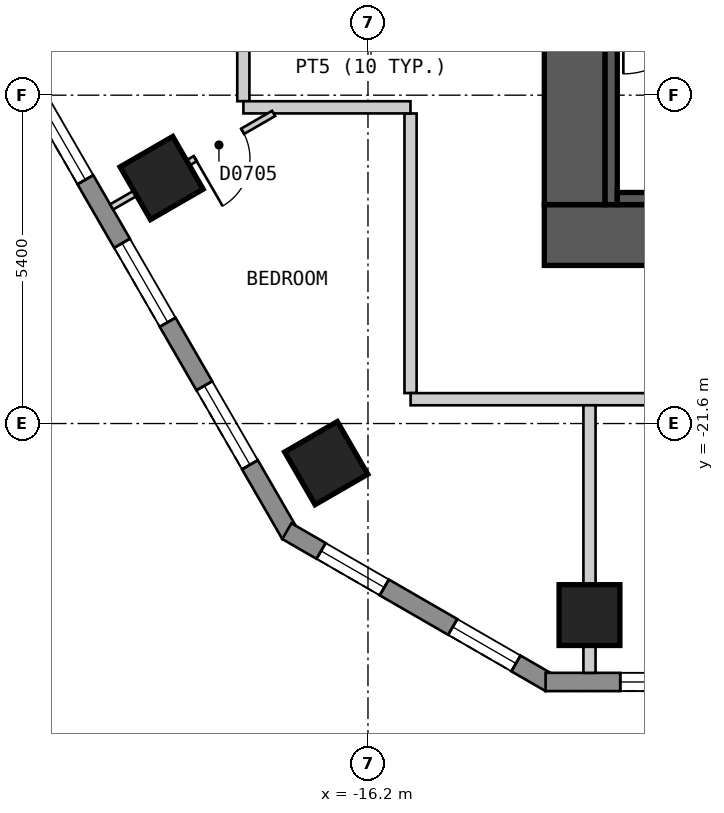
"""IFC4 building model, lengths in metres.
Left out: names, types, materials, properties, quantities, classifications, styles, units other than length and angle.
Written with IfcOpenShell. Run it as: python <this file> out.ifc"""

import sys

from ifc_helpers import new_model, si_unit, direction, frame, frame_2d, origin, origin_2d, place, context, subcontext, project, spatial, polyline, rectangle, outline, extrude, element, fill, save


model = new_model("IFC4")
c1 = context("Model", 3, precision=1e-05, world=origin(), true_north=direction((0.0, 1.0)))
c2 = subcontext(c1, "Body", "Model", "MODEL_VIEW")
j1 = project(units=[si_unit("LENGTHUNIT", "METRE"), si_unit("PLANEANGLEUNIT", "RADIAN")], contexts=[c1])
p1 = place(None, origin())
s1 = spatial("IfcSite", under=j1, at=p1, CompositionType="ELEMENT")
p2 = place(p1, origin())
s2 = spatial("IfcBuilding", under=s1, at=p2, CompositionType="ELEMENT")
p3 = place(p2, frame((0.0, 0.0, 99.0)))
s3 = spatial("IfcBuildingStorey", under=s2, at=p3, CompositionType="ELEMENT", Elevation=99.0)
for number, where, z_axis, x_axis in (
    (1, (-19.594, -17.563, 0.0), (0.0, 0.0, 1.0), (0.5, -0.866, 0.0)),
    (2, (-16.887, -22.251, 0.0), (0.0, 0.0, 1.0), (0.5, -0.866, 0.0)),
    (3, (-12.557, -24.75, 0.0), (0.0, 0.0, 1.0), (1.0, 0.0, 0.0)),
):
    element("IfcColumn", number, at=place(p3, frame(where, z_axis=z_axis, x_axis=x_axis)), inside=s3, PredefinedType="COLUMN", context=c2, shape_type="SweptSolid", body=[
        extrude(rectangle(XDim=1.0, YDim=1.0, at=origin_2d()), origin(), (0.0, 0.0, 1.0), 3.0),
    ])
p4 = place(p3, frame((-13.3, -18.5, 0.0), z_axis=(0.0, 0.0, 1.0), x_axis=(1.0, 0.0, 0.0)))
e4 = element("IfcWall", 4, at=p4, inside=s3, PredefinedType="SHEAR", context=c2, shape_type="SweptSolid", body=[
    extrude(rectangle(XDim=26.6, YDim=1.0, at=frame_2d((13.3, 0.0))), origin(), (0.0, 0.0, 1.0), 2.7),
])
p5 = place(p3, frame((-12.8, -18.0, 0.0), z_axis=(0.0, 0.0, 1.0), x_axis=(0.0, 1.0, 0.0)))
e5 = element("IfcWall", 5, at=p5, inside=s3, PredefinedType="SHEAR", context=c2, shape_type="SweptSolid", body=[
    extrude(rectangle(XDim=12.0, YDim=1.0, at=frame_2d((6.0, 0.0))), origin(), (0.0, 0.0, 1.0), 2.7),
])
p6 = place(p5, frame((3.8, 0.0, 0.0)))
e6 = element("IfcOpeningElement", 6, at=p6, cuts=e5, PredefinedType="OPENING", context=c2, shape_type="SweptSolid", body=[
    extrude(rectangle(XDim=1.2, YDim=2.1, at=frame_2d((0.6, 1.05))), frame((0.0, 0.51, 0.0), z_axis=(0.0, -1.0, 0.0), x_axis=(1.0, 0.0, 0.0)), (0.0, 0.0, 1.0), 1.02),
])
p7 = place(p3, frame((-29.027, -3.425, 0.0), z_axis=(0.0, 0.0, 1.0), x_axis=(0.500035407905, -0.866004960056, 0.0)))
e7 = element("IfcWall", 7, at=p7, inside=s3, PredefinedType="SOLIDWALL", context=c2, shape_type="SweptSolid", body=[
    extrude(outline(polyline([(0.0, -0.15), (23.094, -0.15), (23.014, 0.15), (0.08, 0.15), (0.0, -0.15)])), origin(), (0.0, 0.0, 1.0), 2.7),
])
p8 = place(p7, frame((1.324, 0.0, 0.15)))
e8 = element("IfcOpeningElement", 8, at=p8, cuts=e7, PredefinedType="OPENING", context=c2, shape_type="SweptSolid", body=[
    extrude(rectangle(XDim=1.5, YDim=2.1, at=frame_2d((0.75, 1.05))), frame((0.0, 0.16, 0.0), z_axis=(0.0, -1.0, 0.0), x_axis=(1.0, 0.0, 0.0)), (0.0, 0.0, 1.0), 0.32),
])
p9 = place(p7, frame((4.031, 0.0, 0.15)))
e9 = element("IfcOpeningElement", 9, at=p9, cuts=e7, PredefinedType="OPENING", context=c2, shape_type="SweptSolid", body=[
    extrude(rectangle(XDim=1.5, YDim=2.1, at=frame_2d((0.75, 1.05))), frame((0.0, 0.16, 0.0), z_axis=(0.0, -1.0, 0.0), x_axis=(1.0, 0.0, 0.0)), (0.0, 0.0, 1.0), 0.32),
])
p10 = place(p7, frame((6.737, 0.0, 0.15)))
e10 = element("IfcOpeningElement", 10, at=p10, cuts=e7, PredefinedType="OPENING", context=c2, shape_type="SweptSolid", body=[
    extrude(rectangle(XDim=1.5, YDim=2.1, at=frame_2d((0.75, 1.05))), frame((0.0, 0.16, 0.0), z_axis=(0.0, -1.0, 0.0), x_axis=(1.0, 0.0, 0.0)), (0.0, 0.0, 1.0), 0.32),
])
p11 = place(p7, frame((9.444, 0.0, 0.15)))
e11 = element("IfcOpeningElement", 11, at=p11, cuts=e7, PredefinedType="OPENING", context=c2, shape_type="SweptSolid", body=[
    extrude(rectangle(XDim=1.5, YDim=2.1, at=frame_2d((0.75, 1.05))), frame((0.0, 0.16, 0.0), z_axis=(0.0, -1.0, 0.0), x_axis=(1.0, 0.0, 0.0)), (0.0, 0.0, 1.0), 0.32),
])
p12 = place(p7, frame((12.151, 0.0, 0.15)))
e12 = element("IfcOpeningElement", 12, at=p12, cuts=e7, PredefinedType="OPENING", context=c2, shape_type="SweptSolid", body=[
    extrude(rectangle(XDim=1.5, YDim=2.1, at=frame_2d((0.75, 1.05))), frame((0.0, 0.16, 0.0), z_axis=(0.0, -1.0, 0.0), x_axis=(1.0, 0.0, 0.0)), (0.0, 0.0, 1.0), 0.32),
])
p13 = place(p7, frame((14.857, 0.0, 0.15)))
e13 = element("IfcOpeningElement", 13, at=p13, cuts=e7, PredefinedType="OPENING", context=c2, shape_type="SweptSolid", body=[
    extrude(rectangle(XDim=1.5, YDim=2.1, at=frame_2d((0.75, 1.05))), frame((0.0, 0.16, 0.0), z_axis=(0.0, -1.0, 0.0), x_axis=(1.0, 0.0, 0.0)), (0.0, 0.0, 1.0), 0.32),
])
p14 = place(p7, frame((17.564, 0.0, 0.15)))
e14 = element("IfcOpeningElement", 14, at=p14, cuts=e7, PredefinedType="OPENING", context=c2, shape_type="SweptSolid", body=[
    extrude(rectangle(XDim=1.5, YDim=2.1, at=frame_2d((0.75, 1.05))), frame((0.0, 0.16, 0.0), z_axis=(0.0, -1.0, 0.0), x_axis=(1.0, 0.0, 0.0)), (0.0, 0.0, 1.0), 0.32),
])
p15 = place(p7, frame((20.27, 0.0, 0.15)))
e15 = element("IfcOpeningElement", 15, at=p15, cuts=e7, PredefinedType="OPENING", context=c2, shape_type="SweptSolid", body=[
    extrude(rectangle(XDim=1.5, YDim=2.1, at=frame_2d((0.75, 1.05))), frame((0.0, 0.16, 0.0), z_axis=(0.0, -1.0, 0.0), x_axis=(1.0, 0.0, 0.0)), (0.0, 0.0, 1.0), 0.32),
])
p16 = place(p3, frame((-17.534, -23.37, 0.0), z_axis=(0.0, 0.0, 1.0), x_axis=(0.866010750942, -0.50002537861, 0.0)))
e16 = element("IfcWall", 16, at=p16, inside=s3, PredefinedType="SOLIDWALL", context=c2, shape_type="SweptSolid", body=[
    extrude(outline(polyline([(0.0, -0.15), (5.0, -0.15), (4.919, 0.15), (0.08, 0.15), (0.0, -0.15)])), origin(), (0.0, 0.0, 1.0), 2.7),
])
p17 = place(p16, frame((0.65, 0.0, 0.15)))
e17 = element("IfcOpeningElement", 17, at=p17, cuts=e16, PredefinedType="OPENING", context=c2, shape_type="SweptSolid", body=[
    extrude(rectangle(XDim=1.2, YDim=2.1, at=frame_2d((0.6, 1.05))), frame((0.0, 0.16, 0.0), z_axis=(0.0, -1.0, 0.0), x_axis=(1.0, 0.0, 0.0)), (0.0, 0.0, 1.0), 0.32),
])
p18 = place(p16, frame((3.15, 0.0, 0.15)))
e18 = element("IfcOpeningElement", 18, at=p18, cuts=e16, PredefinedType="OPENING", context=c2, shape_type="SweptSolid", body=[
    extrude(rectangle(XDim=1.2, YDim=2.1, at=frame_2d((0.6, 1.05))), frame((0.0, 0.16, 0.0), z_axis=(0.0, -1.0, 0.0), x_axis=(1.0, 0.0, 0.0)), (0.0, 0.0, 1.0), 0.32),
])
p19 = place(p3, frame((-13.279, -25.85, 0.0), z_axis=(0.0, 0.0, 1.0), x_axis=(1.0, 0.0, 0.0)))
e19 = element("IfcWall", 19, at=p19, inside=s3, PredefinedType="SOLIDWALL", context=c2, shape_type="SweptSolid", body=[
    extrude(outline(polyline([(0.0, -0.15), (26.558, -0.15), (26.478, 0.15), (0.08, 0.15), (0.0, -0.15)])), origin(), (0.0, 0.0, 1.0), 2.7),
])
p20 = place(p19, frame((1.228, 0.0, 0.15)))
e20 = element("IfcOpeningElement", 20, at=p20, cuts=e19, PredefinedType="OPENING", context=c2, shape_type="SweptSolid", body=[
    extrude(rectangle(XDim=1.5, YDim=2.1, at=frame_2d((0.75, 1.05))), frame((0.0, 0.16, 0.0), z_axis=(0.0, -1.0, 0.0), x_axis=(1.0, 0.0, 0.0)), (0.0, 0.0, 1.0), 0.32),
])
p21 = place(p19, frame((3.739, 0.0, 0.15)))
e21 = element("IfcOpeningElement", 21, at=p21, cuts=e19, PredefinedType="OPENING", context=c2, shape_type="SweptSolid", body=[
    extrude(rectangle(XDim=1.5, YDim=2.1, at=frame_2d((0.75, 1.05))), frame((0.0, 0.16, 0.0), z_axis=(0.0, -1.0, 0.0), x_axis=(1.0, 0.0, 0.0)), (0.0, 0.0, 1.0), 0.32),
])
p22 = place(p19, frame((6.251, 0.0, 0.15)))
e22 = element("IfcOpeningElement", 22, at=p22, cuts=e19, PredefinedType="OPENING", context=c2, shape_type="SweptSolid", body=[
    extrude(rectangle(XDim=1.5, YDim=2.1, at=frame_2d((0.75, 1.05))), frame((0.0, 0.16, 0.0), z_axis=(0.0, -1.0, 0.0), x_axis=(1.0, 0.0, 0.0)), (0.0, 0.0, 1.0), 0.32),
])
p23 = place(p19, frame((8.762, 0.0, 0.15)))
e23 = element("IfcOpeningElement", 23, at=p23, cuts=e19, PredefinedType="OPENING", context=c2, shape_type="SweptSolid", body=[
    extrude(rectangle(XDim=1.5, YDim=2.1, at=frame_2d((0.75, 1.05))), frame((0.0, 0.16, 0.0), z_axis=(0.0, -1.0, 0.0), x_axis=(1.0, 0.0, 0.0)), (0.0, 0.0, 1.0), 0.32),
])
p24 = place(p19, frame((11.274, 0.0, 0.15)))
e24 = element("IfcOpeningElement", 24, at=p24, cuts=e19, PredefinedType="OPENING", context=c2, shape_type="SweptSolid", body=[
    extrude(rectangle(XDim=1.5, YDim=2.1, at=frame_2d((0.75, 1.05))), frame((0.0, 0.16, 0.0), z_axis=(0.0, -1.0, 0.0), x_axis=(1.0, 0.0, 0.0)), (0.0, 0.0, 1.0), 0.32),
])
p25 = place(p19, frame((13.785, 0.0, 0.15)))
e25 = element("IfcOpeningElement", 25, at=p25, cuts=e19, PredefinedType="OPENING", context=c2, shape_type="SweptSolid", body=[
    extrude(rectangle(XDim=1.5, YDim=2.1, at=frame_2d((0.75, 1.05))), frame((0.0, 0.16, 0.0), z_axis=(0.0, -1.0, 0.0), x_axis=(1.0, 0.0, 0.0)), (0.0, 0.0, 1.0), 0.32),
])
p26 = place(p19, frame((16.297, 0.0, 0.15)))
e26 = element("IfcOpeningElement", 26, at=p26, cuts=e19, PredefinedType="OPENING", context=c2, shape_type="SweptSolid", body=[
    extrude(rectangle(XDim=1.5, YDim=2.1, at=frame_2d((0.75, 1.05))), frame((0.0, 0.16, 0.0), z_axis=(0.0, -1.0, 0.0), x_axis=(1.0, 0.0, 0.0)), (0.0, 0.0, 1.0), 0.32),
])
p27 = place(p19, frame((18.808, 0.0, 0.15)))
e27 = element("IfcOpeningElement", 27, at=p27, cuts=e19, PredefinedType="OPENING", context=c2, shape_type="SweptSolid", body=[
    extrude(rectangle(XDim=1.5, YDim=2.1, at=frame_2d((0.75, 1.05))), frame((0.0, 0.16, 0.0), z_axis=(0.0, -1.0, 0.0), x_axis=(1.0, 0.0, 0.0)), (0.0, 0.0, 1.0), 0.32),
])
p28 = place(p19, frame((21.32, 0.0, 0.15)))
e28 = element("IfcOpeningElement", 28, at=p28, cuts=e19, PredefinedType="OPENING", context=c2, shape_type="SweptSolid", body=[
    extrude(rectangle(XDim=1.5, YDim=2.1, at=frame_2d((0.75, 1.05))), frame((0.0, 0.16, 0.0), z_axis=(0.0, -1.0, 0.0), x_axis=(1.0, 0.0, 0.0)), (0.0, 0.0, 1.0), 0.32),
])
p29 = place(p19, frame((23.831, 0.0, 0.15)))
e29 = element("IfcOpeningElement", 29, at=p29, cuts=e19, PredefinedType="OPENING", context=c2, shape_type="SweptSolid", body=[
    extrude(rectangle(XDim=1.5, YDim=2.1, at=frame_2d((0.75, 1.05))), frame((0.0, 0.16, 0.0), z_axis=(0.0, -1.0, 0.0), x_axis=(1.0, 0.0, 0.0)), (0.0, 0.0, 1.0), 0.32),
])
p30 = place(p3, frame((-15.5, -16.501, 0.0), z_axis=(0.0, 0.0, 1.0), x_axis=(0.0, -1.0, 0.0)))
e30 = element("IfcWall", 30, at=p30, inside=s3, PredefinedType="PARTITIONING", context=c2, shape_type="SweptSolid", body=[
    extrude(rectangle(XDim=4.598, YDim=0.2, at=frame_2d((2.299, 0.0))), origin(), (0.0, 0.0, 1.0), 2.7),
])
p31 = place(p3, frame((-18.25, -10.594, 0.0), z_axis=(0.0, 0.0, 1.0), x_axis=(0.0, -1.0, 0.0)))
e31 = element("IfcWall", 31, at=p31, inside=s3, PredefinedType="PARTITIONING", context=c2, shape_type="SweptSolid", body=[
    extrude(rectangle(XDim=5.705, YDim=0.2, at=frame_2d((2.853, 0.0))), origin(), (0.0, 0.0, 1.0), 2.7),
])
p32 = place(p3, frame((-18.249, -16.4, 0.0), z_axis=(0.0, 0.0, 1.0), x_axis=(1.0, 0.0, 0.0)))
e32 = element("IfcWall", 32, at=p32, inside=s3, PredefinedType="PARTITIONING", context=c2, shape_type="SweptSolid", body=[
    extrude(rectangle(XDim=2.748, YDim=0.2, at=frame_2d((1.374, 0.0))), origin(), (0.0, 0.0, 1.0), 2.7),
])
p33 = place(p3, frame((-15.499, -21.2, 0.0), z_axis=(0.0, 0.0, 1.0), x_axis=(1.0, 0.0, 0.0)))
e33 = element("IfcWall", 33, at=p33, inside=s3, PredefinedType="PARTITIONING", context=c2, shape_type="SweptSolid", body=[
    extrude(rectangle(XDim=30.898, YDim=0.2, at=frame_2d((15.449, 0.0))), origin(), (0.0, 0.0, 1.0), 2.7),
])
p34 = place(p33, frame((9.977, 0.0, 0.0)))
e34 = element("IfcOpeningElement", 34, at=p34, cuts=e33, PredefinedType="OPENING", context=c2, shape_type="SweptSolid", body=[
    extrude(rectangle(XDim=1.0, YDim=2.1, at=frame_2d((0.5, 1.05))), frame((0.0, 0.11, 0.0), z_axis=(0.0, -1.0, 0.0), x_axis=(1.0, 0.0, 0.0)), (0.0, 0.0, 1.0), 0.22),
])
p35 = place(p33, frame((25.046, 0.0, 0.0)))
e35 = element("IfcOpeningElement", 35, at=p35, cuts=e33, PredefinedType="OPENING", context=c2, shape_type="SweptSolid", body=[
    extrude(rectangle(XDim=1.0, YDim=2.1, at=frame_2d((0.5, 1.05))), frame((0.0, 0.11, 0.0), z_axis=(0.0, -1.0, 0.0), x_axis=(1.0, 0.0, 0.0)), (0.0, 0.0, 1.0), 0.22),
])
p36 = place(p3, frame((-20.416, -18.038, 0.0), z_axis=(0.0, 0.0, 1.0), x_axis=(0.866026989333, 0.499997253739, 0.0)))
e36 = element("IfcWall", 36, at=p36, inside=s3, PredefinedType="PARTITIONING", context=c2, shape_type="SweptSolid", body=[
    extrude(rectangle(XDim=3.076, YDim=0.1, at=frame_2d((1.538, 0.0))), origin(), (0.0, 0.0, 1.0), 2.7),
])
p37 = place(p36, frame((1.588, 0.0, 0.0)))
e37 = element("IfcOpeningElement", 37, at=p37, cuts=e36, PredefinedType="OPENING", context=c2, shape_type="SweptSolid", body=[
    extrude(rectangle(XDim=0.9, YDim=2.1, at=frame_2d((0.45, 1.05))), frame((0.0, 0.06, 0.0), z_axis=(0.0, -1.0, 0.0), x_axis=(1.0, 0.0, 0.0)), (0.0, 0.0, 1.0), 0.12),
])
p38 = place(p3, frame((-12.557, -25.7, 0.0), z_axis=(0.0, 0.0, 1.0), x_axis=(0.0, 1.0, 0.0)))
e38 = element("IfcWall", 38, at=p38, inside=s3, PredefinedType="PARTITIONING", context=c2, shape_type="SweptSolid", body=[
    extrude(rectangle(XDim=4.4, YDim=0.2, at=frame_2d((2.2, 0.0))), origin(), (0.0, 0.0, 1.0), 2.7),
])
p39 = place(p3, frame((-12.2, -18.0, 0.0), z_axis=(0.0, 0.0, 1.0), x_axis=(0.0, 1.0, 0.0)))
e39 = element("IfcWall", 39, at=p39, inside=s3, PredefinedType="SOLIDWALL", context=c2, shape_type="SweptSolid", body=[
    extrude(rectangle(XDim=3.15, YDim=0.2, at=frame_2d((1.575, 0.0))), origin(), (0.0, 0.0, 1.0), 2.7),
])
p40 = place(p3, frame((-12.1, -17.9, 0.0), z_axis=(0.0, 0.0, 1.0), x_axis=(1.0, 0.0, 0.0)))
e40 = element("IfcWall", 40, at=p40, inside=s3, PredefinedType="SOLIDWALL", context=c2, shape_type="SweptSolid", body=[
    extrude(rectangle(XDim=5.4, YDim=0.2, at=frame_2d((2.7, 0.0))), origin(), (0.0, 0.0, 1.0), 2.7),
])
p41 = place(p13, origin())
e41 = element("IfcWindow", 41, at=p41, inside=s3, PartitioningType="SINGLE_PANEL", PredefinedType="WINDOW", context=c2, shape_type="SweptSolid", body=[
    extrude(rectangle(XDim=1.5, YDim=2.1, at=frame_2d((0.75, 1.05))), frame((0.0, 0.03, 0.0), z_axis=(0.0, -1.0, 0.0), x_axis=(1.0, 0.0, 0.0)), (0.0, 0.0, 1.0), 0.06),
])
fill(e13, e41)
p42 = place(p14, origin())
e42 = element("IfcWindow", 42, at=p42, inside=s3, PartitioningType="SINGLE_PANEL", PredefinedType="WINDOW", context=c2, shape_type="SweptSolid", body=[
    extrude(rectangle(XDim=1.5, YDim=2.1, at=frame_2d((0.75, 1.05))), frame((0.0, 0.03, 0.0), z_axis=(0.0, -1.0, 0.0), x_axis=(1.0, 0.0, 0.0)), (0.0, 0.0, 1.0), 0.06),
])
fill(e14, e42)
p43 = place(p15, origin())
e43 = element("IfcWindow", 43, at=p43, inside=s3, PartitioningType="SINGLE_PANEL", PredefinedType="WINDOW", context=c2, shape_type="SweptSolid", body=[
    extrude(rectangle(XDim=1.5, YDim=2.1, at=frame_2d((0.75, 1.05))), frame((0.0, 0.03, 0.0), z_axis=(0.0, -1.0, 0.0), x_axis=(1.0, 0.0, 0.0)), (0.0, 0.0, 1.0), 0.06),
])
fill(e15, e43)
p44 = place(p17, origin())
e44 = element("IfcWindow", 44, at=p44, inside=s3, PartitioningType="SINGLE_PANEL", PredefinedType="WINDOW", context=c2, shape_type="SweptSolid", body=[
    extrude(rectangle(XDim=1.2, YDim=2.1, at=frame_2d((0.6, 1.05))), frame((0.0, 0.03, 0.0), z_axis=(0.0, -1.0, 0.0), x_axis=(1.0, 0.0, 0.0)), (0.0, 0.0, 1.0), 0.06),
])
fill(e17, e44)
p45 = place(p18, origin())
e45 = element("IfcWindow", 45, at=p45, inside=s3, PartitioningType="SINGLE_PANEL", PredefinedType="WINDOW", context=c2, shape_type="SweptSolid", body=[
    extrude(rectangle(XDim=1.2, YDim=2.1, at=frame_2d((0.6, 1.05))), frame((0.0, 0.03, 0.0), z_axis=(0.0, -1.0, 0.0), x_axis=(1.0, 0.0, 0.0)), (0.0, 0.0, 1.0), 0.06),
])
fill(e18, e45)
p46 = place(p20, origin())
e46 = element("IfcWindow", 46, at=p46, inside=s3, PartitioningType="SINGLE_PANEL", PredefinedType="WINDOW", context=c2, shape_type="SweptSolid", body=[
    extrude(rectangle(XDim=1.5, YDim=2.1, at=frame_2d((0.75, 1.05))), frame((0.0, 0.03, 0.0), z_axis=(0.0, -1.0, 0.0), x_axis=(1.0, 0.0, 0.0)), (0.0, 0.0, 1.0), 0.06),
])
fill(e20, e46)
p47 = place(p37, origin())
e47 = element("IfcDoor", 47, at=p47, inside=s3, OperationType="SINGLE_SWING_LEFT", PredefinedType="DOOR", context=c2, shape_type="SweptSolid", body=[
    extrude(rectangle(XDim=0.9, YDim=2.1, at=frame_2d((0.45, 1.05))), frame((0.0, 0.025, 0.0), z_axis=(0.0, -1.0, 0.0), x_axis=(1.0, 0.0, 0.0)), (0.0, 0.0, 1.0), 0.05),
])
fill(e37, e47)
save(model, sys.argv[1])
